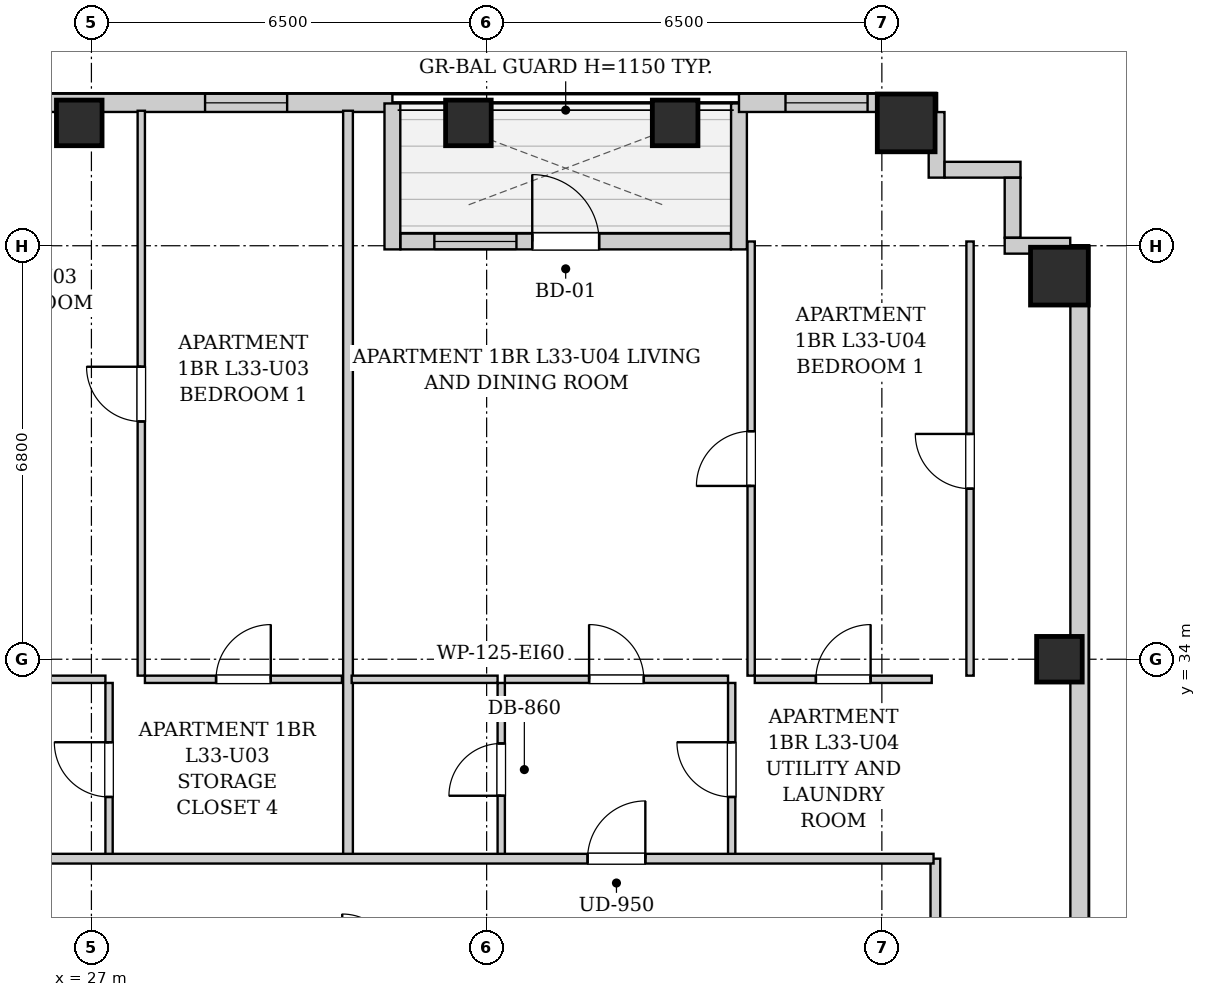
"""IFC4 building model, lengths in metres.
Left out: names, types, materials, properties, quantities, classifications, styles, units other than length and angle.
Written with IfcOpenShell. Run it as: python <this file> out.ifc"""

import sys

from ifc_helpers import new_model, si_unit, direction, frame, frame_2d, origin, origin_2d, place, context, subcontext, project, spatial, rectangle, extrude, element, fill, save


model = new_model("IFC4")
c1 = context("Model", 3, precision=1e-05, world=origin(), true_north=direction((0.0, 1.0)))
c2 = subcontext(c1, "Body", "Model", "MODEL_VIEW")
j1 = project(units=[si_unit("LENGTHUNIT", "METRE"), si_unit("PLANEANGLEUNIT", "RADIAN")], contexts=[c1])
p1 = place(None, origin())
s1 = spatial("IfcSite", under=j1, at=p1, CompositionType="ELEMENT")
p2 = place(p1, origin())
s2 = spatial("IfcBuilding", under=s1, at=p2, CompositionType="ELEMENT")
p3 = place(p2, frame((0.0, 0.0, 116.7)))
s3 = spatial("IfcBuildingStorey", under=s2, at=p3, CompositionType="ELEMENT", Elevation=116.7)
for number, where, z_axis, x_axis in (
    (1, (26.8, 42.82, 0.0), (0.0, 0.0, 1.0), (1.0, 0.0, 0.0)),
    (2, (33.2, 42.82, 0.0), (0.0, 0.0, 1.0), (1.0, 0.0, 0.0)),
    (3, (36.6, 42.82, 0.0), (0.0, 0.0, 1.0), (1.0, 0.0, 0.0)),
):
    element("IfcColumn", number, at=place(p3, frame(where, z_axis=z_axis, x_axis=x_axis)), inside=s3, PredefinedType="COLUMN", context=c2, shape_type="SweptSolid", body=[
        extrude(rectangle(XDim=0.75, YDim=0.75, at=origin_2d()), origin(), (0.0, 0.0, 1.0), 3.2),
    ])
p4 = place(p3, frame((40.4, 42.82, 0.0), z_axis=(0.0, 0.0, 1.0), x_axis=(1.0, 0.0, 0.0)))
e4 = element("IfcColumn", 4, at=p4, inside=s3, PredefinedType="COLUMN", context=c2, shape_type="SweptSolid", body=[
    extrude(rectangle(XDim=0.95, YDim=0.95, at=origin_2d()), origin(), (0.0, 0.0, 1.0), 3.2),
])
p5 = place(p3, frame((42.92, 34.0, 0.0), z_axis=(0.0, 0.0, 1.0), x_axis=(1.0, 0.0, 0.0)))
e5 = element("IfcColumn", 5, at=p5, inside=s3, PredefinedType="COLUMN", context=c2, shape_type="SweptSolid", body=[
    extrude(rectangle(XDim=0.75, YDim=0.75, at=origin_2d()), origin(), (0.0, 0.0, 1.0), 3.2),
])
p6 = place(p3, frame((42.92, 40.3, 0.0), z_axis=(0.0, 0.0, 1.0), x_axis=(1.0, 0.0, 0.0)))
e6 = element("IfcColumn", 6, at=p6, inside=s3, PredefinedType="COLUMN", context=c2, shape_type="SweptSolid", body=[
    extrude(rectangle(XDim=0.95, YDim=0.95, at=origin_2d()), origin(), (0.0, 0.0, 1.0), 3.2),
])
p7 = place(p3, frame((10.0, 43.15, 0.0), z_axis=(0.0, 0.0, 1.0), x_axis=(1.0, 0.0, 0.0)))
e7 = element("IfcWall", 7, at=p7, inside=s3, PredefinedType="SOLIDWALL", context=c2, shape_type="SweptSolid", body=[
    extrude(rectangle(XDim=21.95, YDim=0.3, at=frame_2d((10.975, 0.0))), origin(), (0.0, 0.0, 1.0), 2.88),
])
p8 = place(p7, frame((5.489, 0.0, 0.55)))
e8 = element("IfcOpeningElement", 8, at=p8, cuts=e7, PredefinedType="OPENING", context=c2, shape_type="SweptSolid", body=[
    extrude(rectangle(XDim=1.35, YDim=1.2, at=frame_2d((0.675, 0.6))), frame((0.0, 0.16, 0.0), z_axis=(0.0, -1.0, 0.0), x_axis=(1.0, 0.0, 0.0)), (0.0, 0.0, 1.0), 0.32),
])
p9 = place(p7, frame((9.322, 0.0, 0.55)))
e9 = element("IfcOpeningElement", 9, at=p9, cuts=e7, PredefinedType="OPENING", context=c2, shape_type="SweptSolid", body=[
    extrude(rectangle(XDim=1.35, YDim=1.2, at=frame_2d((0.675, 0.6))), frame((0.0, 0.16, 0.0), z_axis=(0.0, -1.0, 0.0), x_axis=(1.0, 0.0, 0.0)), (0.0, 0.0, 1.0), 0.32),
])
p10 = place(p7, frame((18.869, 0.0, 0.55)))
e10 = element("IfcOpeningElement", 10, at=p10, cuts=e7, PredefinedType="OPENING", context=c2, shape_type="SweptSolid", body=[
    extrude(rectangle(XDim=1.35, YDim=1.2, at=frame_2d((0.675, 0.6))), frame((0.0, 0.16, 0.0), z_axis=(0.0, -1.0, 0.0), x_axis=(1.0, 0.0, 0.0)), (0.0, 0.0, 1.0), 0.32),
])
p11 = place(p3, frame((31.95, 43.14, 0.0), z_axis=(0.0, 0.0, 1.0), x_axis=(0.0, -1.0, 0.0)))
e11 = element("IfcWall", 11, at=p11, inside=s3, PredefinedType="SOLIDWALL", context=c2, shape_type="SweptSolid", body=[
    extrude(rectangle(XDim=2.4, YDim=0.26, at=frame_2d((1.2, 0.0))), origin(), (0.0, 0.0, 1.0), 2.88),
])
p12 = place(p3, frame((32.084, 40.87, 0.0), z_axis=(0.0, 0.0, 1.0), x_axis=(1.0, 0.0, 0.0)))
e12 = element("IfcWall", 12, at=p12, inside=s3, PredefinedType="SOLIDWALL", context=c2, shape_type="SweptSolid", body=[
    extrude(rectangle(XDim=5.432, YDim=0.26, at=frame_2d((2.716, 0.0))), origin(), (0.0, 0.0, 1.0), 2.88),
])
p13 = place(p12, frame((2.166, 0.0, 0.0)))
e13 = element("IfcOpeningElement", 13, at=p13, cuts=e12, PredefinedType="OPENING", context=c2, shape_type="SweptSolid", body=[
    extrude(rectangle(XDim=1.1, YDim=2.0, at=frame_2d((0.55, 1.0))), frame((0.0, 0.14, 0.0), z_axis=(0.0, -1.0, 0.0), x_axis=(1.0, 0.0, 0.0)), (0.0, 0.0, 1.0), 0.28),
])
p14 = place(p12, frame((0.556, 0.0, 0.55)))
e14 = element("IfcOpeningElement", 14, at=p14, cuts=e12, PredefinedType="OPENING", context=c2, shape_type="SweptSolid", body=[
    extrude(rectangle(XDim=1.35, YDim=1.2, at=frame_2d((0.675, 0.6))), frame((0.0, 0.14, 0.0), z_axis=(0.0, -1.0, 0.0), x_axis=(1.0, 0.0, 0.0)), (0.0, 0.0, 1.0), 0.28),
])
p15 = place(p3, frame((37.65, 40.74, 0.0), z_axis=(0.0, 0.0, 1.0), x_axis=(0.0, 1.0, 0.0)))
e15 = element("IfcWall", 15, at=p15, inside=s3, PredefinedType="SOLIDWALL", context=c2, shape_type="SweptSolid", body=[
    extrude(rectangle(XDim=2.4, YDim=0.26, at=frame_2d((1.2, 0.0))), origin(), (0.0, 0.0, 1.0), 2.88),
])
p16 = place(p3, frame((37.65, 43.15, 0.0), z_axis=(0.0, 0.0, 1.0), x_axis=(1.0, 0.0, 0.0)))
e16 = element("IfcWall", 16, at=p16, inside=s3, PredefinedType="SOLIDWALL", context=c2, shape_type="SweptSolid", body=[
    extrude(rectangle(XDim=3.25, YDim=0.3, at=frame_2d((1.625, 0.0))), origin(), (0.0, 0.0, 1.0), 2.88),
])
p17 = place(p16, frame((0.765, 0.0, 0.55)))
e17 = element("IfcOpeningElement", 17, at=p17, cuts=e16, PredefinedType="OPENING", context=c2, shape_type="SweptSolid", body=[
    extrude(rectangle(XDim=1.35, YDim=1.2, at=frame_2d((0.675, 0.6))), frame((0.0, 0.16, 0.0), z_axis=(0.0, -1.0, 0.0), x_axis=(1.0, 0.0, 0.0)), (0.0, 0.0, 1.0), 0.32),
])
p18 = place(p3, frame((43.25, 40.8, 0.0), z_axis=(0.0, 0.0, 1.0), x_axis=(0.0, -1.0, 0.0)))
e18 = element("IfcWall", 18, at=p18, inside=s3, PredefinedType="SOLIDWALL", context=c2, shape_type="SweptSolid", body=[
    extrude(rectangle(XDim=12.6, YDim=0.3, at=frame_2d((6.3, 0.0))), origin(), (0.0, 0.0, 1.0), 2.88),
])
p19 = place(p3, frame((40.9, 42.998, 0.0), z_axis=(0.0, 0.0, 1.0), x_axis=(0.0, -1.0, 0.0)))
e19 = element("IfcWall", 19, at=p19, inside=s3, PredefinedType="SOLIDWALL", context=c2, shape_type="SweptSolid", body=[
    extrude(rectangle(XDim=1.078, YDim=0.26, at=frame_2d((0.539, 0.0))), origin(), (0.0, 0.0, 1.0), 2.88),
])
p20 = place(p3, frame((41.032, 42.05, 0.0), z_axis=(0.0, 0.0, 1.0), x_axis=(1.0, 0.0, 0.0)))
e20 = element("IfcWall", 20, at=p20, inside=s3, PredefinedType="SOLIDWALL", context=c2, shape_type="SweptSolid", body=[
    extrude(rectangle(XDim=1.248, YDim=0.26, at=frame_2d((0.624, 0.0))), origin(), (0.0, 0.0, 1.0), 2.88),
])
p21 = place(p3, frame((42.15, 41.918, 0.0), z_axis=(0.0, 0.0, 1.0), x_axis=(0.0, -1.0, 0.0)))
e21 = element("IfcWall", 21, at=p21, inside=s3, PredefinedType="SOLIDWALL", context=c2, shape_type="SweptSolid", body=[
    extrude(rectangle(XDim=0.986, YDim=0.26, at=frame_2d((0.493, 0.0))), origin(), (0.0, 0.0, 1.0), 2.88),
])
p22 = place(p3, frame((42.02, 40.8, 0.0), z_axis=(0.0, 0.0, 1.0), x_axis=(1.0, 0.0, 0.0)))
e22 = element("IfcWall", 22, at=p22, inside=s3, PredefinedType="SOLIDWALL", context=c2, shape_type="SweptSolid", body=[
    extrude(rectangle(XDim=1.078, YDim=0.26, at=frame_2d((0.539, 0.0))), origin(), (0.0, 0.0, 1.0), 2.88),
])
p23 = place(p3, frame((40.88, 28.98, 0.0), z_axis=(0.0, 0.0, 1.0), x_axis=(0.0, 1.0, 0.0)))
e23 = element("IfcWall", 23, at=p23, inside=s3, PredefinedType="PARTITIONING", context=c2, shape_type="SweptSolid", body=[
    extrude(rectangle(XDim=1.74, YDim=0.16, at=frame_2d((0.87, 0.0))), origin(), (0.0, 0.0, 1.0), 2.88),
])
p24 = place(p3, frame((27.29, 30.76, 0.0), z_axis=(0.0, 0.0, 1.0), x_axis=(0.0, 1.0, 0.0)))
e24 = element("IfcWall", 24, at=p24, inside=s3, PredefinedType="PARTITIONING", context=c2, shape_type="SweptSolid", body=[
    extrude(rectangle(XDim=2.85, YDim=0.12, at=frame_2d((1.425, 0.0))), origin(), (0.0, 0.0, 1.0), 2.88),
])
p25 = place(p24, frame((0.975, 0.0, 0.0)))
e25 = element("IfcOpeningElement", 25, at=p25, cuts=e24, PredefinedType="OPENING", context=c2, shape_type="SweptSolid", body=[
    extrude(rectangle(XDim=0.9, YDim=2.05, at=frame_2d((0.45, 1.025))), frame((0.0, 0.07, 0.0), z_axis=(0.0, -1.0, 0.0), x_axis=(1.0, 0.0, 0.0)), (0.0, 0.0, 1.0), 0.14),
])
p26 = place(p3, frame((23.63, 33.67, 0.0), z_axis=(0.0, 0.0, 1.0), x_axis=(1.0, 0.0, 0.0)))
e26 = element("IfcWall", 26, at=p26, inside=s3, PredefinedType="PARTITIONING", context=c2, shape_type="SweptSolid", body=[
    extrude(rectangle(XDim=3.6, YDim=0.12, at=frame_2d((1.8, 0.0))), origin(), (0.0, 0.0, 1.0), 2.88),
])
p27 = place(p26, frame((1.35, 0.0, 0.0)))
e27 = element("IfcOpeningElement", 27, at=p27, cuts=e26, PredefinedType="OPENING", context=c2, shape_type="SweptSolid", body=[
    extrude(rectangle(XDim=0.9, YDim=2.05, at=frame_2d((0.45, 1.025))), frame((0.0, 0.07, 0.0), z_axis=(0.0, -1.0, 0.0), x_axis=(1.0, 0.0, 0.0)), (0.0, 0.0, 1.0), 0.14),
])
p28 = place(p3, frame((27.88, 33.67, 0.0), z_axis=(0.0, 0.0, 1.0), x_axis=(1.0, 0.0, 0.0)))
e28 = element("IfcWall", 28, at=p28, inside=s3, PredefinedType="PARTITIONING", context=c2, shape_type="SweptSolid", body=[
    extrude(rectangle(XDim=3.24, YDim=0.12, at=frame_2d((1.62, 0.0))), origin(), (0.0, 0.0, 1.0), 2.88),
])
p29 = place(p28, frame((1.17, 0.0, 0.0)))
e29 = element("IfcOpeningElement", 29, at=p29, cuts=e28, PredefinedType="OPENING", context=c2, shape_type="SweptSolid", body=[
    extrude(rectangle(XDim=0.9, YDim=2.05, at=frame_2d((0.45, 1.025))), frame((0.0, 0.07, 0.0), z_axis=(0.0, -1.0, 0.0), x_axis=(1.0, 0.0, 0.0)), (0.0, 0.0, 1.0), 0.14),
])
p30 = place(p3, frame((27.82, 33.73, 0.0), z_axis=(0.0, 0.0, 1.0), x_axis=(0.0, 1.0, 0.0)))
e30 = element("IfcWall", 30, at=p30, inside=s3, PredefinedType="PARTITIONING", context=c2, shape_type="SweptSolid", body=[
    extrude(rectangle(XDim=9.29, YDim=0.12, at=frame_2d((4.645, 0.0))), origin(), (0.0, 0.0, 1.0), 2.88),
])
p31 = place(p30, frame((4.18, 0.0, 0.0)))
e31 = element("IfcOpeningElement", 31, at=p31, cuts=e30, PredefinedType="OPENING", context=c2, shape_type="SweptSolid", body=[
    extrude(rectangle(XDim=0.9, YDim=2.05, at=frame_2d((0.45, 1.025))), frame((0.0, 0.07, 0.0), z_axis=(0.0, -1.0, 0.0), x_axis=(1.0, 0.0, 0.0)), (0.0, 0.0, 1.0), 0.14),
])
p32 = place(p3, frame((31.22, 30.76, 0.0), z_axis=(0.0, 0.0, 1.0), x_axis=(0.0, 1.0, 0.0)))
e32 = element("IfcWall", 32, at=p32, inside=s3, PredefinedType="PARTITIONING", context=c2, shape_type="SweptSolid", body=[
    extrude(rectangle(XDim=12.26, YDim=0.16, at=frame_2d((6.13, 0.0))), origin(), (0.0, 0.0, 1.0), 2.88),
])
p33 = place(p3, frame((33.74, 30.76, 0.0), z_axis=(0.0, 0.0, 1.0), x_axis=(0.0, 1.0, 0.0)))
e33 = element("IfcWall", 33, at=p33, inside=s3, PredefinedType="PARTITIONING", context=c2, shape_type="SweptSolid", body=[
    extrude(rectangle(XDim=2.85, YDim=0.12, at=frame_2d((1.425, 0.0))), origin(), (0.0, 0.0, 1.0), 2.88),
])
p34 = place(p33, frame((0.995, 0.0, 0.0)))
e34 = element("IfcOpeningElement", 34, at=p34, cuts=e33, PredefinedType="OPENING", context=c2, shape_type="SweptSolid", body=[
    extrude(rectangle(XDim=0.86, YDim=2.05, at=frame_2d((0.43, 1.025))), frame((0.0, 0.07, 0.0), z_axis=(0.0, -1.0, 0.0), x_axis=(1.0, 0.0, 0.0)), (0.0, 0.0, 1.0), 0.14),
])
p35 = place(p3, frame((31.28, 33.67, 0.0), z_axis=(0.0, 0.0, 1.0), x_axis=(1.0, 0.0, 0.0)))
e35 = element("IfcWall", 35, at=p35, inside=s3, PredefinedType="PARTITIONING", context=c2, shape_type="SweptSolid", body=[
    extrude(rectangle(XDim=2.4, YDim=0.12, at=frame_2d((1.2, 0.0))), origin(), (0.0, 0.0, 1.0), 2.88),
])
p36 = place(p3, frame((37.53, 30.76, 0.0), z_axis=(0.0, 0.0, 1.0), x_axis=(0.0, 1.0, 0.0)))
e36 = element("IfcWall", 36, at=p36, inside=s3, PredefinedType="PARTITIONING", context=c2, shape_type="SweptSolid", body=[
    extrude(rectangle(XDim=2.85, YDim=0.12, at=frame_2d((1.425, 0.0))), origin(), (0.0, 0.0, 1.0), 2.88),
])
p37 = place(p36, frame((0.975, 0.0, 0.0)))
e37 = element("IfcOpeningElement", 37, at=p37, cuts=e36, PredefinedType="OPENING", context=c2, shape_type="SweptSolid", body=[
    extrude(rectangle(XDim=0.9, YDim=2.05, at=frame_2d((0.45, 1.025))), frame((0.0, 0.07, 0.0), z_axis=(0.0, -1.0, 0.0), x_axis=(1.0, 0.0, 0.0)), (0.0, 0.0, 1.0), 0.14),
])
p38 = place(p3, frame((33.8, 33.67, 0.0), z_axis=(0.0, 0.0, 1.0), x_axis=(1.0, 0.0, 0.0)))
e38 = element("IfcWall", 38, at=p38, inside=s3, PredefinedType="PARTITIONING", context=c2, shape_type="SweptSolid", body=[
    extrude(rectangle(XDim=3.67, YDim=0.12, at=frame_2d((1.835, 0.0))), origin(), (0.0, 0.0, 1.0), 2.88),
])
p39 = place(p38, frame((1.385, 0.0, 0.0)))
e39 = element("IfcOpeningElement", 39, at=p39, cuts=e38, PredefinedType="OPENING", context=c2, shape_type="SweptSolid", body=[
    extrude(rectangle(XDim=0.9, YDim=2.05, at=frame_2d((0.45, 1.025))), frame((0.0, 0.07, 0.0), z_axis=(0.0, -1.0, 0.0), x_axis=(1.0, 0.0, 0.0)), (0.0, 0.0, 1.0), 0.14),
])
p40 = place(p3, frame((37.91, 33.67, 0.0), z_axis=(0.0, 0.0, 1.0), x_axis=(1.0, 0.0, 0.0)))
e40 = element("IfcWall", 40, at=p40, inside=s3, PredefinedType="PARTITIONING", context=c2, shape_type="SweptSolid", body=[
    extrude(rectangle(XDim=2.91, YDim=0.12, at=frame_2d((1.455, 0.0))), origin(), (0.0, 0.0, 1.0), 2.88),
])
p41 = place(p40, frame((1.005, 0.0, 0.0)))
e41 = element("IfcOpeningElement", 41, at=p41, cuts=e40, PredefinedType="OPENING", context=c2, shape_type="SweptSolid", body=[
    extrude(rectangle(XDim=0.9, YDim=2.05, at=frame_2d((0.45, 1.025))), frame((0.0, 0.07, 0.0), z_axis=(0.0, -1.0, 0.0), x_axis=(1.0, 0.0, 0.0)), (0.0, 0.0, 1.0), 0.14),
])
p42 = place(p3, frame((37.85, 33.73, 0.0), z_axis=(0.0, 0.0, 1.0), x_axis=(0.0, 1.0, 0.0)))
e42 = element("IfcWall", 42, at=p42, inside=s3, PredefinedType="PARTITIONING", context=c2, shape_type="SweptSolid", body=[
    extrude(rectangle(XDim=7.14, YDim=0.12, at=frame_2d((3.57, 0.0))), origin(), (0.0, 0.0, 1.0), 2.88),
])
p43 = place(p42, frame((3.12, 0.0, 0.0)))
e43 = element("IfcOpeningElement", 43, at=p43, cuts=e42, PredefinedType="OPENING", context=c2, shape_type="SweptSolid", body=[
    extrude(rectangle(XDim=0.9, YDim=2.05, at=frame_2d((0.45, 1.025))), frame((0.0, 0.07, 0.0), z_axis=(0.0, -1.0, 0.0), x_axis=(1.0, 0.0, 0.0)), (0.0, 0.0, 1.0), 0.14),
])
p44 = place(p3, frame((41.45, 33.73, 0.0), z_axis=(0.0, 0.0, 1.0), x_axis=(0.0, 1.0, 0.0)))
e44 = element("IfcWall", 44, at=p44, inside=s3, PredefinedType="PARTITIONING", context=c2, shape_type="SweptSolid", body=[
    extrude(rectangle(XDim=7.14, YDim=0.12, at=frame_2d((3.57, 0.0))), origin(), (0.0, 0.0, 1.0), 2.88),
])
p45 = place(p44, frame((3.075, 0.0, 0.0)))
e45 = element("IfcOpeningElement", 45, at=p45, cuts=e44, PredefinedType="OPENING", context=c2, shape_type="SweptSolid", body=[
    extrude(rectangle(XDim=0.9, YDim=2.05, at=frame_2d((0.45, 1.025))), frame((0.0, 0.07, 0.0), z_axis=(0.0, -1.0, 0.0), x_axis=(1.0, 0.0, 0.0)), (0.0, 0.0, 1.0), 0.14),
])
p46 = place(p3, frame((10.05, 30.72, 0.0), z_axis=(0.0, 0.0, 1.0), x_axis=(1.0, 0.0, 0.0)))
e46 = element("IfcWall", 46, at=p46, inside=s3, PredefinedType="PARTITIONING", context=c2, shape_type="SweptSolid", body=[
    extrude(rectangle(XDim=30.8, YDim=0.16, at=frame_2d((15.4, 0.0))), origin(), (0.0, 0.0, 1.0), 2.88),
])
p47 = place(p46, frame((4.035, 0.0, 0.0)))
e47 = element("IfcOpeningElement", 47, at=p47, cuts=e46, PredefinedType="OPENING", context=c2, shape_type="SweptSolid", body=[
    extrude(rectangle(XDim=0.95, YDim=2.1, at=frame_2d((0.475, 1.05))), frame((0.0, 0.09, 0.0), z_axis=(0.0, -1.0, 0.0), x_axis=(1.0, 0.0, 0.0)), (0.0, 0.0, 1.0), 0.18),
])
p48 = place(p46, frame((25.11, 0.0, 0.0)))
e48 = element("IfcOpeningElement", 48, at=p48, cuts=e46, PredefinedType="OPENING", context=c2, shape_type="SweptSolid", body=[
    extrude(rectangle(XDim=0.95, YDim=2.1, at=frame_2d((0.475, 1.05))), frame((0.0, 0.09, 0.0), z_axis=(0.0, -1.0, 0.0), x_axis=(1.0, 0.0, 0.0)), (0.0, 0.0, 1.0), 0.18),
])
p49 = place(p25, origin())
e49 = element("IfcDoor", 49, at=p49, inside=s3, OperationType="SINGLE_SWING_RIGHT", PredefinedType="DOOR", context=c2, shape_type="SweptSolid", body=[
    extrude(rectangle(XDim=0.9, YDim=2.05, at=frame_2d((0.45, 1.025))), frame((0.0, 0.025, 0.0), z_axis=(0.0, -1.0, 0.0), x_axis=(1.0, 0.0, 0.0)), (0.0, 0.0, 1.0), 0.05),
])
fill(e25, e49)
p50 = place(p29, origin())
e50 = element("IfcDoor", 50, at=p50, inside=s3, OperationType="SINGLE_SWING_RIGHT", PredefinedType="DOOR", context=c2, shape_type="SweptSolid", body=[
    extrude(rectangle(XDim=0.9, YDim=2.05, at=frame_2d((0.45, 1.025))), frame((0.0, 0.025, 0.0), z_axis=(0.0, -1.0, 0.0), x_axis=(1.0, 0.0, 0.0)), (0.0, 0.0, 1.0), 0.05),
])
fill(e29, e50)
p51 = place(p31, origin())
e51 = element("IfcDoor", 51, at=p51, inside=s3, OperationType="SINGLE_SWING_RIGHT", PredefinedType="DOOR", context=c2, shape_type="SweptSolid", body=[
    extrude(rectangle(XDim=0.9, YDim=2.05, at=frame_2d((0.45, 1.025))), frame((0.0, 0.025, 0.0), z_axis=(0.0, -1.0, 0.0), x_axis=(1.0, 0.0, 0.0)), (0.0, 0.0, 1.0), 0.05),
])
fill(e31, e51)
p52 = place(p34, origin())
e52 = element("IfcDoor", 52, at=p52, inside=s3, OperationType="SINGLE_SWING_LEFT", PredefinedType="DOOR", context=c2, shape_type="SweptSolid", body=[
    extrude(rectangle(XDim=0.86, YDim=2.05, at=frame_2d((0.43, 1.025))), frame((0.0, 0.025, 0.0), z_axis=(0.0, -1.0, 0.0), x_axis=(1.0, 0.0, 0.0)), (0.0, 0.0, 1.0), 0.05),
])
fill(e34, e52)
p53 = place(p37, origin())
e53 = element("IfcDoor", 53, at=p53, inside=s3, OperationType="SINGLE_SWING_RIGHT", PredefinedType="DOOR", context=c2, shape_type="SweptSolid", body=[
    extrude(rectangle(XDim=0.9, YDim=2.05, at=frame_2d((0.45, 1.025))), frame((0.0, 0.025, 0.0), z_axis=(0.0, -1.0, 0.0), x_axis=(1.0, 0.0, 0.0)), (0.0, 0.0, 1.0), 0.05),
])
fill(e37, e53)
p54 = place(p39, origin())
e54 = element("IfcDoor", 54, at=p54, inside=s3, OperationType="SINGLE_SWING_LEFT", PredefinedType="DOOR", context=c2, shape_type="SweptSolid", body=[
    extrude(rectangle(XDim=0.9, YDim=2.05, at=frame_2d((0.45, 1.025))), frame((0.0, 0.025, 0.0), z_axis=(0.0, -1.0, 0.0), x_axis=(1.0, 0.0, 0.0)), (0.0, 0.0, 1.0), 0.05),
])
fill(e39, e54)
p55 = place(p41, origin())
e55 = element("IfcDoor", 55, at=p55, inside=s3, OperationType="SINGLE_SWING_RIGHT", PredefinedType="DOOR", context=c2, shape_type="SweptSolid", body=[
    extrude(rectangle(XDim=0.9, YDim=2.05, at=frame_2d((0.45, 1.025))), frame((0.0, 0.025, 0.0), z_axis=(0.0, -1.0, 0.0), x_axis=(1.0, 0.0, 0.0)), (0.0, 0.0, 1.0), 0.05),
])
fill(e41, e55)
p56 = place(p43, origin())
e56 = element("IfcDoor", 56, at=p56, inside=s3, OperationType="SINGLE_SWING_LEFT", PredefinedType="DOOR", context=c2, shape_type="SweptSolid", body=[
    extrude(rectangle(XDim=0.9, YDim=2.05, at=frame_2d((0.45, 1.025))), frame((0.0, 0.025, 0.0), z_axis=(0.0, -1.0, 0.0), x_axis=(1.0, 0.0, 0.0)), (0.0, 0.0, 1.0), 0.05),
])
fill(e43, e56)
p57 = place(p45, origin())
e57 = element("IfcDoor", 57, at=p57, inside=s3, OperationType="SINGLE_SWING_RIGHT", PredefinedType="DOOR", context=c2, shape_type="SweptSolid", body=[
    extrude(rectangle(XDim=0.9, YDim=2.05, at=frame_2d((0.45, 1.025))), frame((0.0, 0.025, 0.0), z_axis=(0.0, -1.0, 0.0), x_axis=(1.0, 0.0, 0.0)), (0.0, 0.0, 1.0), 0.05),
])
fill(e45, e57)
p58 = place(p48, origin())
e58 = element("IfcDoor", 58, at=p58, inside=s3, OperationType="SINGLE_SWING_RIGHT", PredefinedType="DOOR", context=c2, shape_type="SweptSolid", body=[
    extrude(rectangle(XDim=0.95, YDim=2.1, at=frame_2d((0.475, 1.05))), frame((0.0, 0.025, 0.0), z_axis=(0.0, -1.0, 0.0), x_axis=(1.0, 0.0, 0.0)), (0.0, 0.0, 1.0), 0.05),
])
fill(e48, e58)
p59 = place(p13, origin())
e59 = element("IfcDoor", 59, at=p59, inside=s3, OperationType="SINGLE_SWING_LEFT", PredefinedType="DOOR", context=c2, shape_type="SweptSolid", body=[
    extrude(rectangle(XDim=1.1, YDim=2.0, at=frame_2d((0.55, 1.0))), frame((0.0, 0.025, 0.0), z_axis=(0.0, -1.0, 0.0), x_axis=(1.0, 0.0, 0.0)), (0.0, 0.0, 1.0), 0.05),
])
fill(e13, e59)
p60 = place(p10, origin())
e60 = element("IfcWindow", 60, at=p60, inside=s3, PartitioningType="SINGLE_PANEL", PredefinedType="WINDOW", context=c2, shape_type="SweptSolid", body=[
    extrude(rectangle(XDim=1.35, YDim=1.2, at=frame_2d((0.675, 0.6))), frame((0.0, 0.03, 0.0), z_axis=(0.0, -1.0, 0.0), x_axis=(1.0, 0.0, 0.0)), (0.0, 0.0, 1.0), 0.06),
])
fill(e10, e60)
p61 = place(p14, origin())
e61 = element("IfcWindow", 61, at=p61, inside=s3, PartitioningType="SINGLE_PANEL", PredefinedType="WINDOW", context=c2, shape_type="SweptSolid", body=[
    extrude(rectangle(XDim=1.35, YDim=1.2, at=frame_2d((0.675, 0.6))), frame((0.0, 0.03, 0.0), z_axis=(0.0, -1.0, 0.0), x_axis=(1.0, 0.0, 0.0)), (0.0, 0.0, 1.0), 0.06),
])
fill(e14, e61)
p62 = place(p17, origin())
e62 = element("IfcWindow", 62, at=p62, inside=s3, PartitioningType="SINGLE_PANEL", PredefinedType="WINDOW", context=c2, shape_type="SweptSolid", body=[
    extrude(rectangle(XDim=1.35, YDim=1.2, at=frame_2d((0.675, 0.6))), frame((0.0, 0.03, 0.0), z_axis=(0.0, -1.0, 0.0), x_axis=(1.0, 0.0, 0.0)), (0.0, 0.0, 1.0), 0.06),
])
fill(e17, e62)
save(model, sys.argv[1])
